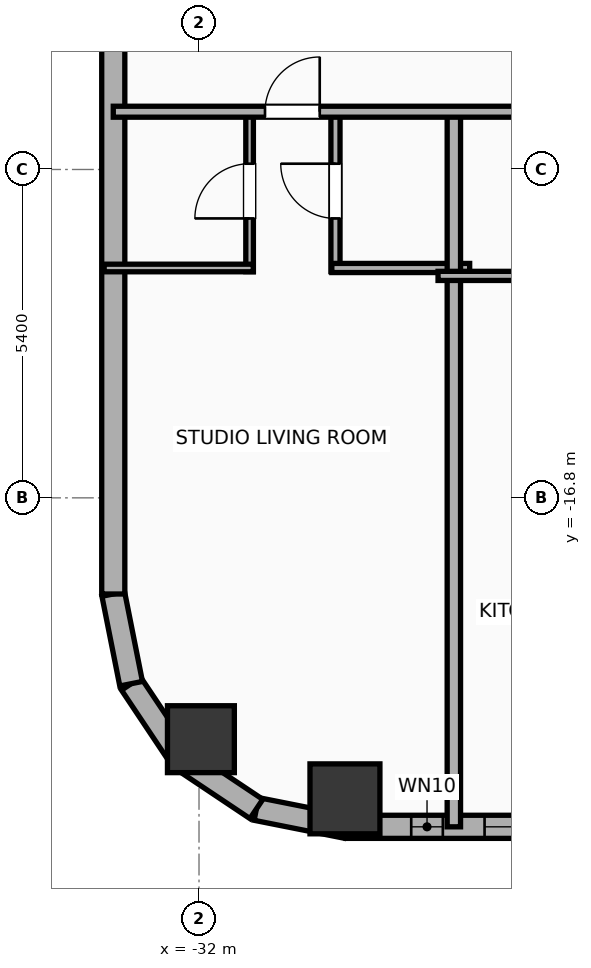
"""IFC4 building model, lengths in metres.
Left out: names, types, materials, properties, quantities, classifications, styles, units other than length and angle.
Written with IfcOpenShell. Run it as: python <this file> out.ifc"""

import sys

from ifc_helpers import new_model, si_unit, direction, frame, frame_2d, origin, origin_2d, place, context, subcontext, project, spatial, rectangle, hollow_rectangle, hollow_circle, extrude, element, fill, save


model = new_model("IFC4")
c1 = context("Model", 3, precision=1e-05, world=origin(), true_north=direction((0.0, 1.0)))
c2 = subcontext(c1, "Body", "Model", "MODEL_VIEW")
j1 = project(units=[si_unit("LENGTHUNIT", "METRE"), si_unit("PLANEANGLEUNIT", "RADIAN")], contexts=[c1])
p1 = place(None, origin())
s1 = spatial("IfcSite", under=j1, at=p1, CompositionType="ELEMENT")
p2 = place(p1, origin())
s2 = spatial("IfcBuilding", under=s1, at=p2, CompositionType="ELEMENT")
p3 = place(p2, frame((0.0, 0.0, 72.8)))
s3 = spatial("IfcBuildingStorey", under=s2, at=p3, CompositionType="ELEMENT", Elevation=72.8)
p4 = place(p3, frame((-29.6, -21.75, 0.0), z_axis=(0.0, 0.0, 1.0), x_axis=(1.0, 0.0, 0.0)))
e1 = element("IfcColumn", 1, at=p4, inside=s3, PredefinedType="COLUMN", context=c2, shape_type="SweptSolid", body=[
    extrude(hollow_rectangle(XDim=1.15, YDim=1.15, WallThickness=0.04, at=origin_2d()), origin(), (0.0, 0.0, 1.0), 3.9),
])
p5 = place(p3, frame((-31.969, -20.769, 0.0), z_axis=(0.0, 0.0, 1.0), x_axis=(1.0, 0.0, 0.0)))
e2 = element("IfcColumn", 2, at=p5, inside=s3, PredefinedType="COLUMN", context=c2, shape_type="SweptSolid", body=[
    extrude(hollow_circle(Radius=0.55, WallThickness=0.036, at=origin_2d()), origin(), (0.0, 0.0, 1.0), 3.9),
])
p6 = place(p3, frame((22.381, -22.21, 0.0), z_axis=(0.0, 0.0, 1.0), x_axis=(-1.0, 0.0, 0.0)))
e3 = element("IfcWall", 3, at=p6, inside=s3, PredefinedType="ELEMENTEDWALL", context=c2, shape_type="SweptSolid", body=[
    extrude(rectangle(XDim=51.963, YDim=0.38, at=frame_2d((25.981, 0.0))), origin(), (0.0, 0.0, 1.0), 3.65),
])
p7 = place(p6, frame((50.372, 0.0, 0.75)))
e4 = element("IfcOpeningElement", 4, at=p7, cuts=e3, PredefinedType="OPENING", context=c2, shape_type="SweptSolid", body=[
    extrude(rectangle(XDim=0.52, YDim=2.05, at=frame_2d((0.26, 1.025))), frame((0.0, 0.2, 0.0), z_axis=(0.0, -1.0, 0.0), x_axis=(1.0, 0.0, 0.0)), (0.0, 0.0, 1.0), 0.4),
])
p8 = place(p6, frame((45.681, 0.0, 0.75)))
e5 = element("IfcOpeningElement", 5, at=p8, cuts=e3, PredefinedType="OPENING", context=c2, shape_type="SweptSolid", body=[
    extrude(rectangle(XDim=1.2, YDim=2.05, at=frame_2d((0.6, 1.025))), frame((0.0, 0.2, 0.0), z_axis=(0.0, -1.0, 0.0), x_axis=(1.0, 0.0, 0.0)), (0.0, 0.0, 1.0), 0.4),
])
p9 = place(p6, frame((48.485, 0.0, 0.75)))
e6 = element("IfcOpeningElement", 6, at=p9, cuts=e3, PredefinedType="OPENING", context=c2, shape_type="SweptSolid", body=[
    extrude(rectangle(XDim=1.2, YDim=2.05, at=frame_2d((0.6, 1.025))), frame((0.0, 0.2, 0.0), z_axis=(0.0, -1.0, 0.0), x_axis=(1.0, 0.0, 0.0)), (0.0, 0.0, 1.0), 0.4),
])
p10 = place(p6, frame((42.426, 0.0, 0.75)))
e7 = element("IfcOpeningElement", 7, at=p10, cuts=e3, PredefinedType="OPENING", context=c2, shape_type="SweptSolid", body=[
    extrude(rectangle(XDim=1.2, YDim=2.05, at=frame_2d((0.6, 1.025))), frame((0.0, 0.2, 0.0), z_axis=(0.0, -1.0, 0.0), x_axis=(1.0, 0.0, 0.0)), (0.0, 0.0, 1.0), 0.4),
])
p11 = place(p6, frame((37.486, 0.0, 0.75)))
e8 = element("IfcOpeningElement", 8, at=p11, cuts=e3, PredefinedType="OPENING", context=c2, shape_type="SweptSolid", body=[
    extrude(rectangle(XDim=1.2, YDim=2.05, at=frame_2d((0.6, 1.025))), frame((0.0, 0.2, 0.0), z_axis=(0.0, -1.0, 0.0), x_axis=(1.0, 0.0, 0.0)), (0.0, 0.0, 1.0), 0.4),
])
p12 = place(p6, frame((33.386, 0.0, 0.75)))
e9 = element("IfcOpeningElement", 9, at=p12, cuts=e3, PredefinedType="OPENING", context=c2, shape_type="SweptSolid", body=[
    extrude(rectangle(XDim=1.2, YDim=2.05, at=frame_2d((0.6, 1.025))), frame((0.0, 0.2, 0.0), z_axis=(0.0, -1.0, 0.0), x_axis=(1.0, 0.0, 0.0)), (0.0, 0.0, 1.0), 0.4),
])
p13 = place(p6, frame((29.166, 0.0, 0.75)))
e10 = element("IfcOpeningElement", 10, at=p13, cuts=e3, PredefinedType="OPENING", context=c2, shape_type="SweptSolid", body=[
    extrude(rectangle(XDim=1.2, YDim=2.05, at=frame_2d((0.6, 1.025))), frame((0.0, 0.2, 0.0), z_axis=(0.0, -1.0, 0.0), x_axis=(1.0, 0.0, 0.0)), (0.0, 0.0, 1.0), 0.4),
])
p14 = place(p6, frame((26.081, 0.0, 0.75)))
e11 = element("IfcOpeningElement", 11, at=p14, cuts=e3, PredefinedType="OPENING", context=c2, shape_type="SweptSolid", body=[
    extrude(rectangle(XDim=1.2, YDim=2.05, at=frame_2d((0.6, 1.025))), frame((0.0, 0.2, 0.0), z_axis=(0.0, -1.0, 0.0), x_axis=(1.0, 0.0, 0.0)), (0.0, 0.0, 1.0), 0.4),
])
p15 = place(p6, frame((21.981, 0.0, 0.75)))
e12 = element("IfcOpeningElement", 12, at=p15, cuts=e3, PredefinedType="OPENING", context=c2, shape_type="SweptSolid", body=[
    extrude(rectangle(XDim=1.2, YDim=2.05, at=frame_2d((0.6, 1.025))), frame((0.0, 0.2, 0.0), z_axis=(0.0, -1.0, 0.0), x_axis=(1.0, 0.0, 0.0)), (0.0, 0.0, 1.0), 0.4),
])
p16 = place(p6, frame((16.986, 0.0, 0.75)))
e13 = element("IfcOpeningElement", 13, at=p16, cuts=e3, PredefinedType="OPENING", context=c2, shape_type="SweptSolid", body=[
    extrude(rectangle(XDim=1.2, YDim=2.05, at=frame_2d((0.6, 1.025))), frame((0.0, 0.2, 0.0), z_axis=(0.0, -1.0, 0.0), x_axis=(1.0, 0.0, 0.0)), (0.0, 0.0, 1.0), 0.4),
])
p17 = place(p6, frame((12.886, 0.0, 0.75)))
e14 = element("IfcOpeningElement", 14, at=p17, cuts=e3, PredefinedType="OPENING", context=c2, shape_type="SweptSolid", body=[
    extrude(rectangle(XDim=1.2, YDim=2.05, at=frame_2d((0.6, 1.025))), frame((0.0, 0.2, 0.0), z_axis=(0.0, -1.0, 0.0), x_axis=(1.0, 0.0, 0.0)), (0.0, 0.0, 1.0), 0.4),
])
p18 = place(p6, frame((8.306, 0.0, 0.75)))
e15 = element("IfcOpeningElement", 15, at=p18, cuts=e3, PredefinedType="OPENING", context=c2, shape_type="SweptSolid", body=[
    extrude(rectangle(XDim=1.2, YDim=2.05, at=frame_2d((0.6, 1.025))), frame((0.0, 0.2, 0.0), z_axis=(0.0, -1.0, 0.0), x_axis=(1.0, 0.0, 0.0)), (0.0, 0.0, 1.0), 0.4),
])
p19 = place(p6, frame((4.686, 0.0, 0.75)))
e16 = element("IfcOpeningElement", 16, at=p19, cuts=e3, PredefinedType="OPENING", context=c2, shape_type="SweptSolid", body=[
    extrude(rectangle(XDim=1.2, YDim=2.05, at=frame_2d((0.6, 1.025))), frame((0.0, 0.2, 0.0), z_axis=(0.0, -1.0, 0.0), x_axis=(1.0, 0.0, 0.0)), (0.0, 0.0, 1.0), 0.4),
])
p20 = place(p6, frame((1.635, 0.0, 0.75)))
e17 = element("IfcOpeningElement", 17, at=p20, cuts=e3, PredefinedType="OPENING", context=c2, shape_type="SweptSolid", body=[
    extrude(rectangle(XDim=1.2, YDim=2.05, at=frame_2d((0.6, 1.025))), frame((0.0, 0.2, 0.0), z_axis=(0.0, -1.0, 0.0), x_axis=(1.0, 0.0, 0.0)), (0.0, 0.0, 1.0), 0.4),
])
p21 = place(p3, frame((-29.581, -22.21, 0.0), z_axis=(0.0, 0.0, 1.0), x_axis=(-0.980786132421, 0.195086038585, 0.0)))
e18 = element("IfcWall", 18, at=p21, inside=s3, PredefinedType="ELEMENTEDWALL", context=c2, shape_type="SweptSolid", body=[
    extrude(rectangle(XDim=1.504, YDim=0.38, at=frame_2d((0.752, 0.0))), origin(), (0.0, 0.0, 1.0), 3.65),
])
p22 = place(p3, frame((-31.057, -21.917, 0.0), z_axis=(0.0, 0.0, 1.0), x_axis=(-0.831442848281, 0.555610286119, 0.0)))
e19 = element("IfcWall", 19, at=p22, inside=s3, PredefinedType="ELEMENTEDWALL", context=c2, shape_type="SweptSolid", body=[
    extrude(rectangle(XDim=1.485, YDim=0.38, at=frame_2d((0.743, 0.0))), origin(), (0.0, 0.0, 1.0), 3.65),
])
p23 = place(p3, frame((-32.292, -21.091, 0.0), z_axis=(0.0, 0.0, 1.0), x_axis=(-0.555572577804, 0.831468045563, 0.0)))
e20 = element("IfcWall", 20, at=p23, inside=s3, PredefinedType="ELEMENTEDWALL", context=c2, shape_type="SweptSolid", body=[
    extrude(rectangle(XDim=1.485, YDim=0.38, at=frame_2d((0.742, 0.0))), origin(), (0.0, 0.0, 1.0), 3.65),
])
p24 = place(p3, frame((-33.116, -19.857, 0.0), z_axis=(0.0, 0.0, 1.0), x_axis=(-0.195086038585, 0.980786132421, 0.0)))
e21 = element("IfcWall", 21, at=p24, inside=s3, PredefinedType="ELEMENTEDWALL", context=c2, shape_type="SweptSolid", body=[
    extrude(rectangle(XDim=1.504, YDim=0.38, at=frame_2d((0.752, 0.0))), origin(), (0.0, 0.0, 1.0), 3.65),
])
p25 = place(p3, frame((-33.41, -18.381, 0.0), z_axis=(0.0, 0.0, 1.0), x_axis=(0.0, 1.0, 0.0)))
e22 = element("IfcWall", 22, at=p25, inside=s3, PredefinedType="ELEMENTEDWALL", context=c2, shape_type="SweptSolid", body=[
    extrude(rectangle(XDim=36.763, YDim=0.38, at=frame_2d((18.381, 0.0))), origin(), (0.0, 0.0, 1.0), 3.65),
])
p26 = place(p25, frame((33.032, 0.0, 0.75)))
e23 = element("IfcOpeningElement", 23, at=p26, cuts=e22, PredefinedType="OPENING", context=c2, shape_type="SweptSolid", body=[
    extrude(rectangle(XDim=1.2, YDim=2.05, at=frame_2d((0.6, 1.025))), frame((0.0, 0.2, 0.0), z_axis=(0.0, -1.0, 0.0), x_axis=(1.0, 0.0, 0.0)), (0.0, 0.0, 1.0), 0.4),
])
p27 = place(p25, frame((22.301, 0.0, 0.75)))
e24 = element("IfcOpeningElement", 24, at=p27, cuts=e22, PredefinedType="OPENING", context=c2, shape_type="SweptSolid", body=[
    extrude(rectangle(XDim=1.2, YDim=2.05, at=frame_2d((0.6, 1.025))), frame((0.0, 0.2, 0.0), z_axis=(0.0, -1.0, 0.0), x_axis=(1.0, 0.0, 0.0)), (0.0, 0.0, 1.0), 0.4),
])
p28 = place(p25, frame((13.401, 0.0, 0.75)))
e25 = element("IfcOpeningElement", 25, at=p28, cuts=e22, PredefinedType="OPENING", context=c2, shape_type="SweptSolid", body=[
    extrude(rectangle(XDim=1.2, YDim=2.05, at=frame_2d((0.6, 1.025))), frame((0.0, 0.2, 0.0), z_axis=(0.0, -1.0, 0.0), x_axis=(1.0, 0.0, 0.0)), (0.0, 0.0, 1.0), 0.4),
])
p29 = place(p3, frame((-31.168, -13.08, 0.0), z_axis=(0.0, 0.0, 1.0), x_axis=(0.0, 1.0, 0.0)))
e26 = element("IfcWall", 26, at=p29, inside=s3, PredefinedType="PARTITIONING", context=c2, shape_type="SweptSolid", body=[
    extrude(rectangle(XDim=2.65, YDim=0.125, at=frame_2d((1.325, 0.0))), origin(), (0.0, 0.0, 1.0), 3.65),
])
p30 = place(p29, frame((0.875, 0.0, 0.0)))
e27 = element("IfcOpeningElement", 27, at=p30, cuts=e26, PredefinedType="OPENING", context=c2, shape_type="SweptSolid", body=[
    extrude(rectangle(XDim=0.9, YDim=2.05, at=frame_2d((0.45, 1.025))), frame((0.0, 0.073, 0.0), z_axis=(0.0, -1.0, 0.0), x_axis=(1.0, 0.0, 0.0)), (0.0, 0.0, 1.0), 0.145),
])
p31 = place(p3, frame((-29.756, -13.08, 0.0), z_axis=(0.0, 0.0, 1.0), x_axis=(0.0, 1.0, 0.0)))
e28 = element("IfcWall", 28, at=p31, inside=s3, PredefinedType="PLUMBINGWALL", context=c2, shape_type="SweptSolid", body=[
    extrude(rectangle(XDim=2.65, YDim=0.15, at=frame_2d((1.325, 0.0))), origin(), (0.0, 0.0, 1.0), 3.65),
])
p32 = place(p31, frame((0.875, 0.0, 0.0)))
e29 = element("IfcOpeningElement", 29, at=p32, cuts=e28, PredefinedType="OPENING", context=c2, shape_type="SweptSolid", body=[
    extrude(rectangle(XDim=0.9, YDim=2.05, at=frame_2d((0.45, 1.025))), frame((0.0, 0.085, 0.0), z_axis=(0.0, -1.0, 0.0), x_axis=(1.0, 0.0, 0.0)), (0.0, 0.0, 1.0), 0.17),
])
p33 = place(p3, frame((-33.56, -13.02, 0.0), z_axis=(0.0, 0.0, 1.0), x_axis=(1.0, 0.0, 0.0)))
e30 = element("IfcWall", 30, at=p33, inside=s3, PredefinedType="PARTITIONING", context=c2, shape_type="SweptSolid", body=[
    extrude(rectangle(XDim=2.452, YDim=0.125, at=frame_2d((1.226, 0.0))), origin(), (0.0, 0.0, 1.0), 3.65),
])
p34 = place(p3, frame((-29.816, -13.02, 0.0), z_axis=(0.0, 0.0, 1.0), x_axis=(1.0, 0.0, 0.0)))
e31 = element("IfcWall", 31, at=p34, inside=s3, PredefinedType="PLUMBINGWALL", context=c2, shape_type="SweptSolid", body=[
    extrude(rectangle(XDim=2.267, YDim=0.15, at=frame_2d((1.133, 0.0))), origin(), (0.0, 0.0, 1.0), 3.65),
])
p35 = place(p3, frame((-27.809, -22.21, 0.0), z_axis=(0.0, 0.0, 1.0), x_axis=(0.0, 1.0, 0.0)))
e32 = element("IfcWall", 32, at=p35, inside=s3, PredefinedType="PARTITIONING", context=c2, shape_type="SweptSolid", body=[
    extrude(rectangle(XDim=11.84, YDim=0.22, at=frame_2d((5.92, 0.0))), origin(), (0.0, 0.0, 1.0), 3.65),
])
p36 = place(p3, frame((-28.069, -13.15, 0.0), z_axis=(0.0, 0.0, 1.0), x_axis=(1.0, 0.0, 0.0)))
e33 = element("IfcWall", 33, at=p36, inside=s3, PredefinedType="PLUMBINGWALL", context=c2, shape_type="SweptSolid", body=[
    extrude(rectangle(XDim=2.55, YDim=0.15, at=frame_2d((1.275, 0.0))), origin(), (0.0, 0.0, 1.0), 3.65),
])
p37 = place(p3, frame((-33.41, -10.45, 0.0), z_axis=(0.0, 0.0, 1.0), x_axis=(1.0, 0.0, 0.0)))
e34 = element("IfcWall", 34, at=p37, inside=s3, PredefinedType="PARTITIONING", context=c2, shape_type="SweptSolid", body=[
    extrude(rectangle(XDim=59.62, YDim=0.18, at=frame_2d((29.81, 0.0))), origin(), (0.0, 0.0, 1.0), 3.65),
])
p38 = place(p37, frame((2.495, 0.0, 0.0)))
e35 = element("IfcOpeningElement", 35, at=p38, cuts=e34, PredefinedType="OPENING", context=c2, shape_type="SweptSolid", body=[
    extrude(rectangle(XDim=0.9, YDim=2.05, at=frame_2d((0.45, 1.025))), frame((0.0, 0.1, 0.0), z_axis=(0.0, -1.0, 0.0), x_axis=(1.0, 0.0, 0.0)), (0.0, 0.0, 1.0), 0.2),
])
p39 = place(p37, frame((8.905, 0.0, 0.0)))
e36 = element("IfcOpeningElement", 36, at=p39, cuts=e34, PredefinedType="OPENING", context=c2, shape_type="SweptSolid", body=[
    extrude(rectangle(XDim=1.15, YDim=2.05, at=frame_2d((0.575, 1.025))), frame((0.0, 0.1, 0.0), z_axis=(0.0, -1.0, 0.0), x_axis=(1.0, 0.0, 0.0)), (0.0, 0.0, 1.0), 0.2),
])
p40 = place(p37, frame((14.902, 0.0, 0.0)))
e37 = element("IfcOpeningElement", 37, at=p40, cuts=e34, PredefinedType="OPENING", context=c2, shape_type="SweptSolid", body=[
    extrude(rectangle(XDim=1.15, YDim=2.05, at=frame_2d((0.575, 1.025))), frame((0.0, 0.1, 0.0), z_axis=(0.0, -1.0, 0.0), x_axis=(1.0, 0.0, 0.0)), (0.0, 0.0, 1.0), 0.2),
])
p41 = place(p37, frame((23.112, 0.0, 0.0)))
e38 = element("IfcOpeningElement", 38, at=p41, cuts=e34, PredefinedType="OPENING", context=c2, shape_type="SweptSolid", body=[
    extrude(rectangle(XDim=1.15, YDim=2.05, at=frame_2d((0.575, 1.025))), frame((0.0, 0.1, 0.0), z_axis=(0.0, -1.0, 0.0), x_axis=(1.0, 0.0, 0.0)), (0.0, 0.0, 1.0), 0.2),
])
p42 = place(p37, frame((31.572, 0.0, 0.0)))
e39 = element("IfcOpeningElement", 39, at=p42, cuts=e34, PredefinedType="OPENING", context=c2, shape_type="SweptSolid", body=[
    extrude(rectangle(XDim=0.9, YDim=2.05, at=frame_2d((0.45, 1.025))), frame((0.0, 0.1, 0.0), z_axis=(0.0, -1.0, 0.0), x_axis=(1.0, 0.0, 0.0)), (0.0, 0.0, 1.0), 0.2),
])
p43 = place(p37, frame((39.502, 0.0, 0.0)))
e40 = element("IfcOpeningElement", 40, at=p43, cuts=e34, PredefinedType="OPENING", context=c2, shape_type="SweptSolid", body=[
    extrude(rectangle(XDim=1.15, YDim=2.05, at=frame_2d((0.575, 1.025))), frame((0.0, 0.1, 0.0), z_axis=(0.0, -1.0, 0.0), x_axis=(1.0, 0.0, 0.0)), (0.0, 0.0, 1.0), 0.2),
])
p44 = place(p37, frame((47.699, 0.0, 0.0)))
e41 = element("IfcOpeningElement", 41, at=p44, cuts=e34, PredefinedType="OPENING", context=c2, shape_type="SweptSolid", body=[
    extrude(rectangle(XDim=1.15, YDim=2.05, at=frame_2d((0.575, 1.025))), frame((0.0, 0.1, 0.0), z_axis=(0.0, -1.0, 0.0), x_axis=(1.0, 0.0, 0.0)), (0.0, 0.0, 1.0), 0.2),
])
p45 = place(p37, frame((55.539, 0.0, 0.0)))
e42 = element("IfcOpeningElement", 42, at=p45, cuts=e34, PredefinedType="OPENING", context=c2, shape_type="SweptSolid", body=[
    extrude(rectangle(XDim=1.15, YDim=2.05, at=frame_2d((0.575, 1.025))), frame((0.0, 0.1, 0.0), z_axis=(0.0, -1.0, 0.0), x_axis=(1.0, 0.0, 0.0)), (0.0, 0.0, 1.0), 0.2),
])
p46 = place(p7, origin())
e43 = element("IfcWindow", 43, at=p46, inside=s3, PartitioningType="SINGLE_PANEL", PredefinedType="WINDOW", context=c2, shape_type="SweptSolid", body=[
    extrude(rectangle(XDim=0.52, YDim=2.05, at=frame_2d((0.26, 1.025))), frame((0.0, 0.03, 0.0), z_axis=(0.0, -1.0, 0.0), x_axis=(1.0, 0.0, 0.0)), (0.0, 0.0, 1.0), 0.06),
])
fill(e4, e43)
p47 = place(p9, origin())
e44 = element("IfcWindow", 44, at=p47, inside=s3, PartitioningType="SINGLE_PANEL", PredefinedType="WINDOW", context=c2, shape_type="SweptSolid", body=[
    extrude(rectangle(XDim=1.2, YDim=2.05, at=frame_2d((0.6, 1.025))), frame((0.0, 0.03, 0.0), z_axis=(0.0, -1.0, 0.0), x_axis=(1.0, 0.0, 0.0)), (0.0, 0.0, 1.0), 0.06),
])
fill(e6, e44)
p48 = place(p30, origin())
e45 = element("IfcDoor", 45, at=p48, inside=s3, OperationType="SINGLE_SWING_LEFT", PredefinedType="DOOR", context=c2, shape_type="SweptSolid", body=[
    extrude(rectangle(XDim=0.9, YDim=2.05, at=frame_2d((0.45, 1.025))), frame((0.0, 0.025, 0.0), z_axis=(0.0, -1.0, 0.0), x_axis=(1.0, 0.0, 0.0)), (0.0, 0.0, 1.0), 0.05),
])
fill(e27, e45)
p49 = place(p32, origin())
e46 = element("IfcDoor", 46, at=p49, inside=s3, OperationType="SINGLE_SWING_RIGHT", PredefinedType="DOOR", context=c2, shape_type="SweptSolid", body=[
    extrude(rectangle(XDim=0.9, YDim=2.05, at=frame_2d((0.45, 1.025))), frame((0.0, 0.025, 0.0), z_axis=(0.0, -1.0, 0.0), x_axis=(1.0, 0.0, 0.0)), (0.0, 0.0, 1.0), 0.05),
])
fill(e29, e46)
p50 = place(p38, origin())
e47 = element("IfcDoor", 47, at=p50, inside=s3, OperationType="SINGLE_SWING_RIGHT", PredefinedType="DOOR", context=c2, shape_type="SweptSolid", body=[
    extrude(rectangle(XDim=0.9, YDim=2.05, at=frame_2d((0.45, 1.025))), frame((0.0, 0.025, 0.0), z_axis=(0.0, -1.0, 0.0), x_axis=(1.0, 0.0, 0.0)), (0.0, 0.0, 1.0), 0.05),
])
fill(e35, e47)
save(model, sys.argv[1])
